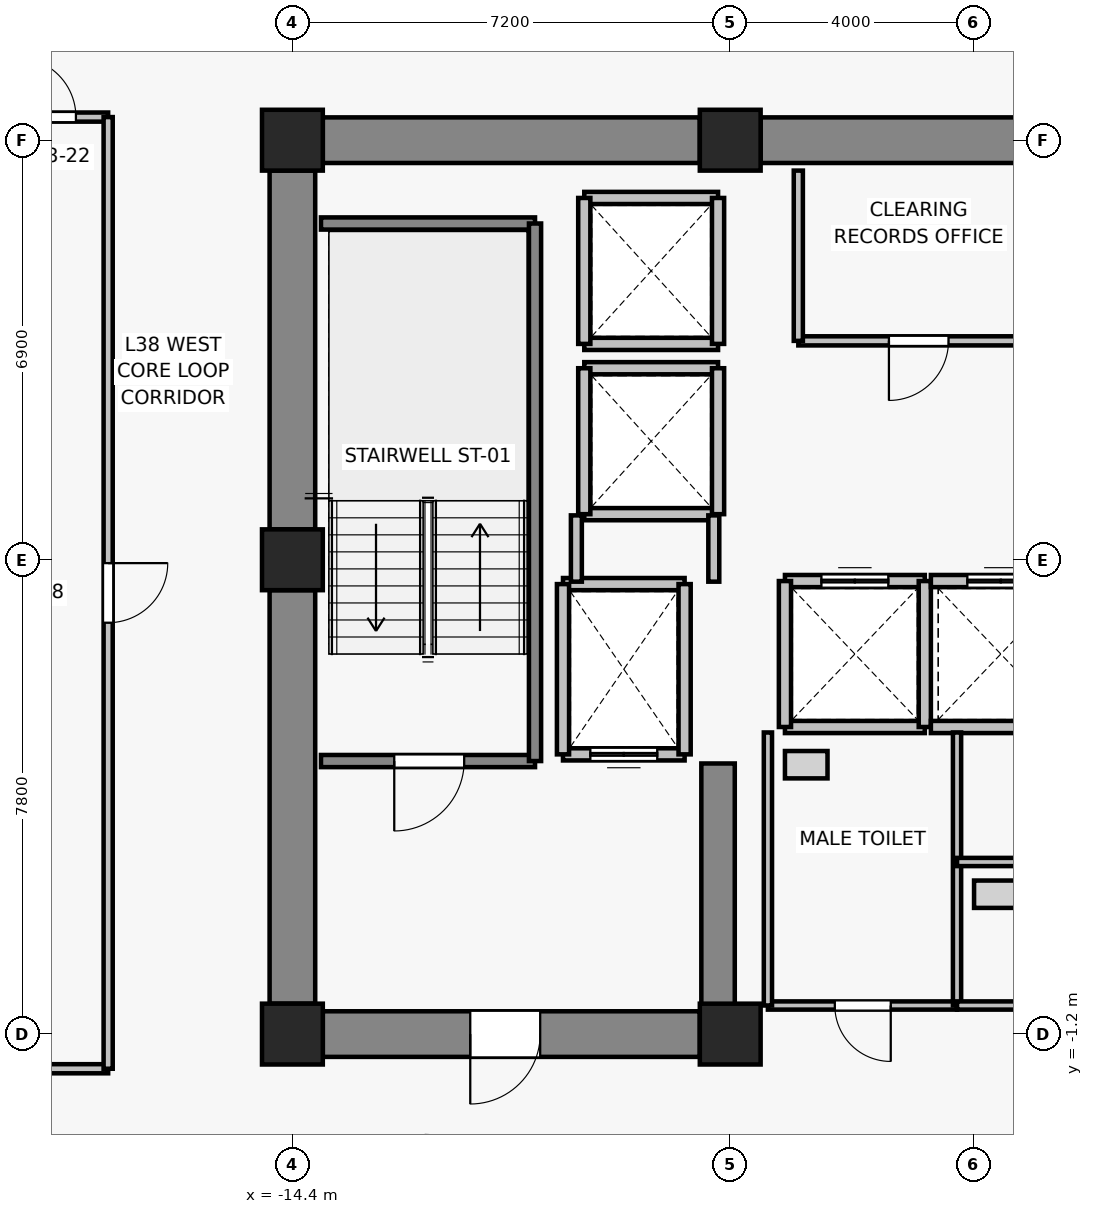
"""IFC4 building model, lengths in metres.
Left out: names, types, materials, properties, quantities, classifications, styles, units other than length and angle.
Written with IfcOpenShell. Run it as: python <this file> out.ifc"""

import sys

from ifc_helpers import new_model, si_unit, direction, frame, frame_2d, origin, origin_2d, place, context, subcontext, project, spatial, rectangle, extrude, source, transform, mapped, element, fill, save


model = new_model("IFC4")
c1 = context("Model", 3, precision=1e-05, world=origin(), true_north=direction((0.0, 1.0)))
c2 = subcontext(c1, "Body", "Model", "MODEL_VIEW")
j1 = project(units=[si_unit("LENGTHUNIT", "METRE"), si_unit("PLANEANGLEUNIT", "RADIAN")], contexts=[c1])
p1 = place(None, origin())
s1 = spatial("IfcSite", under=j1, at=p1, CompositionType="ELEMENT")
p2 = place(p1, origin())
s2 = spatial("IfcBuilding", under=s1, at=p2, CompositionType="ELEMENT")
p3 = place(p2, frame((0.0, 0.0, 136.3)))
s3 = spatial("IfcBuildingStorey", under=s2, at=p3, CompositionType="ELEMENT", Elevation=136.3)
for number, where, z_axis, x_axis in (
    (1, (-14.4, -1.2, 0.0), (0.0, 0.0, 1.0), (1.0, 0.0, 0.0)),
    (2, (-7.2, -1.2, 0.0), (0.0, 0.0, 1.0), (1.0, 0.0, 0.0)),
    (3, (-14.4, 6.6, 0.0), (0.0, 0.0, 1.0), (1.0, 0.0, 0.0)),
    (4, (-14.4, 13.5, 0.0), (0.0, 0.0, 1.0), (1.0, 0.0, 0.0)),
    (5, (-7.2, 13.5, 0.0), (0.0, 0.0, 1.0), (1.0, 0.0, 0.0)),
):
    element("IfcColumn", number, at=place(p3, frame(where, z_axis=z_axis, x_axis=x_axis)), inside=s3, PredefinedType="COLUMN", context=c2, shape_type="SweptSolid", body=[
        extrude(rectangle(XDim=1.0, YDim=1.0, at=origin_2d()), origin(), (0.0, 0.0, 1.0), 3.3),
    ])
p4 = place(p3, frame((-13.9, 13.5, 0.0), z_axis=(0.0, 0.0, 1.0), x_axis=(1.0, 0.0, 0.0)))
e6 = element("IfcWall", 6, at=p4, inside=s3, PredefinedType="SHEAR", context=c2, shape_type="SweptSolid", body=[
    extrude(rectangle(XDim=6.2, YDim=0.75, at=frame_2d((3.1, 0.0))), origin(), (0.0, 0.0, 1.0), 3.05),
])
p5 = place(p3, frame((-6.7, 13.5, 0.0), z_axis=(0.0, 0.0, 1.0), x_axis=(1.0, 0.0, 0.0)))
e7 = element("IfcWall", 7, at=p5, inside=s3, PredefinedType="SHEAR", context=c2, shape_type="SweptSolid", body=[
    extrude(rectangle(XDim=13.4, YDim=0.75, at=frame_2d((6.7, 0.0))), origin(), (0.0, 0.0, 1.0), 3.05),
])
p6 = place(p3, frame((-14.4, -0.7, 0.0), z_axis=(0.0, 0.0, 1.0), x_axis=(0.0, 1.0, 0.0)))
e8 = element("IfcWall", 8, at=p6, inside=s3, PredefinedType="SHEAR", context=c2, shape_type="SweptSolid", body=[
    extrude(rectangle(XDim=6.8, YDim=0.75, at=frame_2d((3.4, 0.0))), origin(), (0.0, 0.0, 1.0), 3.05),
])
p7 = place(p3, frame((-14.4, 7.1, 0.0), z_axis=(0.0, 0.0, 1.0), x_axis=(0.0, 1.0, 0.0)))
e9 = element("IfcWall", 9, at=p7, inside=s3, PredefinedType="SHEAR", context=c2, shape_type="SweptSolid", body=[
    extrude(rectangle(XDim=5.9, YDim=0.75, at=frame_2d((2.95, 0.0))), origin(), (0.0, 0.0, 1.0), 3.05),
])
p8 = place(p3, frame((-7.7, -1.2, 0.0), z_axis=(0.0, 0.0, 1.0), x_axis=(-1.0, 0.0, 0.0)))
e10 = element("IfcWall", 10, at=p8, inside=s3, PredefinedType="SHEAR", context=c2, shape_type="SweptSolid", body=[
    extrude(rectangle(XDim=6.2, YDim=0.75, at=frame_2d((3.1, 0.0))), origin(), (0.0, 0.0, 1.0), 3.05),
])
p9 = place(p8, frame((2.625, 0.0, 0.0)))
e11 = element("IfcOpeningElement", 11, at=p9, cuts=e10, PredefinedType="OPENING", context=c2, shape_type="SweptSolid", body=[
    extrude(rectangle(XDim=1.15, YDim=2.15, at=frame_2d((0.575, 1.075))), frame((0.0, 0.385, 0.0), z_axis=(0.0, -1.0, 0.0), x_axis=(1.0, 0.0, 0.0)), (0.0, 0.0, 1.0), 0.77),
])
p10 = place(p3, frame((-7.4, -0.825, 0.0), z_axis=(0.0, 0.0, 1.0), x_axis=(0.0, 1.0, 0.0)))
e12 = element("IfcWall", 12, at=p10, inside=s3, PredefinedType="SHEAR", context=c2, shape_type="SweptSolid", body=[
    extrude(rectangle(XDim=4.075, YDim=0.55, at=frame_2d((2.038, 0.0))), origin(), (0.0, 0.0, 1.0), 3.05),
])
p11 = place(p3, frame((-7.95, 3.4, 0.0), z_axis=(0.0, 0.0, 1.0), x_axis=(-1.0, 0.0, 0.0)))
e13 = element("IfcWall", 13, at=p11, inside=s3, PredefinedType="SOLIDWALL", context=c2, shape_type="SweptSolid", body=[
    extrude(rectangle(XDim=2.0, YDim=0.2, at=frame_2d((1.0, 0.0))), origin(), (0.0, 0.0, 1.0), 3.05),
])
p12 = place(p11, frame((0.45, 0.0, 0.0)))
e14 = element("IfcOpeningElement", 14, at=p12, cuts=e13, PredefinedType="OPENING", context=c2, shape_type="SweptSolid", body=[
    extrude(rectangle(XDim=1.1, YDim=2.2, at=frame_2d((0.55, 1.1))), frame((0.0, 0.11, 0.0), z_axis=(0.0, -1.0, 0.0), x_axis=(1.0, 0.0, 0.0)), (0.0, 0.0, 1.0), 0.22),
])
p13 = place(p3, frame((-9.95, 6.2, 0.0), z_axis=(0.0, 0.0, 1.0), x_axis=(1.0, 0.0, 0.0)))
e15 = element("IfcWall", 15, at=p13, inside=s3, PredefinedType="SOLIDWALL", context=c2, shape_type="SweptSolid", body=[
    extrude(rectangle(XDim=2.0, YDim=0.2, at=frame_2d((1.0, 0.0))), origin(), (0.0, 0.0, 1.0), 3.05),
])
for number, where, z_axis, x_axis in (
    (16, (-9.95, 3.4, 0.0), (0.0, 0.0, 1.0), (0.0, 1.0, 0.0)),
    (17, (-7.95, 6.2, 0.0), (0.0, 0.0, 1.0), (0.0, -1.0, 0.0)),
):
    element("IfcWall", number, at=place(p3, frame(where, z_axis=z_axis, x_axis=x_axis)), inside=s3, PredefinedType="SOLIDWALL", context=c2, shape_type="SweptSolid", body=[
        extrude(rectangle(XDim=2.8, YDim=0.2, at=frame_2d((1.4, 0.0))), origin(), (0.0, 0.0, 1.0), 3.05),
    ])
p14 = place(p3, frame((-4.0, 3.85, 0.0), z_axis=(0.0, 0.0, 1.0), x_axis=(-1.0, 0.0, 0.0)))
e18 = element("IfcWall", 18, at=p14, inside=s3, PredefinedType="SOLIDWALL", context=c2, shape_type="SweptSolid", body=[
    extrude(rectangle(XDim=2.3, YDim=0.2, at=frame_2d((1.15, 0.0))), origin(), (0.0, 0.0, 1.0), 3.05),
])
p15 = place(p3, frame((-6.3, 6.25, 0.0), z_axis=(0.0, 0.0, 1.0), x_axis=(1.0, 0.0, 0.0)))
e19 = element("IfcWall", 19, at=p15, inside=s3, PredefinedType="SOLIDWALL", context=c2, shape_type="SweptSolid", body=[
    extrude(rectangle(XDim=2.3, YDim=0.2, at=frame_2d((1.15, 0.0))), origin(), (0.0, 0.0, 1.0), 3.05),
])
p16 = place(p15, frame((0.6, 0.0, 0.0)))
e20 = element("IfcOpeningElement", 20, at=p16, cuts=e19, PredefinedType="OPENING", context=c2, shape_type="SweptSolid", body=[
    extrude(rectangle(XDim=1.1, YDim=2.2, at=frame_2d((0.55, 1.1))), frame((0.0, 0.11, 0.0), z_axis=(0.0, -1.0, 0.0), x_axis=(1.0, 0.0, 0.0)), (0.0, 0.0, 1.0), 0.22),
])
for number, where, z_axis, x_axis in (
    (21, (-6.3, 3.85, 0.0), (0.0, 0.0, 1.0), (0.0, 1.0, 0.0)),
    (22, (-4.0, 6.25, 0.0), (0.0, 0.0, 1.0), (0.0, -1.0, 0.0)),
):
    element("IfcWall", number, at=place(p3, frame(where, z_axis=z_axis, x_axis=x_axis)), inside=s3, PredefinedType="SOLIDWALL", context=c2, shape_type="SweptSolid", body=[
        extrude(rectangle(XDim=2.4, YDim=0.2, at=frame_2d((1.2, 0.0))), origin(), (0.0, 0.0, 1.0), 3.05),
    ])
p17 = place(p3, frame((-1.6, 3.85, 0.0), z_axis=(0.0, 0.0, 1.0), x_axis=(-1.0, 0.0, 0.0)))
e23 = element("IfcWall", 23, at=p17, inside=s3, PredefinedType="SOLIDWALL", context=c2, shape_type="SweptSolid", body=[
    extrude(rectangle(XDim=2.3, YDim=0.2, at=frame_2d((1.15, 0.0))), origin(), (0.0, 0.0, 1.0), 3.05),
])
p18 = place(p3, frame((-3.9, 6.25, 0.0), z_axis=(0.0, 0.0, 1.0), x_axis=(1.0, 0.0, 0.0)))
e24 = element("IfcWall", 24, at=p18, inside=s3, PredefinedType="SOLIDWALL", context=c2, shape_type="SweptSolid", body=[
    extrude(rectangle(XDim=2.3, YDim=0.2, at=frame_2d((1.15, 0.0))), origin(), (0.0, 0.0, 1.0), 3.05),
])
p19 = place(p18, frame((0.6, 0.0, 0.0)))
e25 = element("IfcOpeningElement", 25, at=p19, cuts=e24, PredefinedType="OPENING", context=c2, shape_type="SweptSolid", body=[
    extrude(rectangle(XDim=1.1, YDim=2.2, at=frame_2d((0.55, 1.1))), frame((0.0, 0.11, 0.0), z_axis=(0.0, -1.0, 0.0), x_axis=(1.0, 0.0, 0.0)), (0.0, 0.0, 1.0), 0.22),
])
for number, where, z_axis, x_axis in (
    (26, (-7.4, 7.35, 0.0), (0.0, 0.0, 1.0), (-1.0, 0.0, 0.0)),
    (27, (-9.6, 9.75, 0.0), (0.0, 0.0, 1.0), (1.0, 0.0, 0.0)),
):
    element("IfcWall", number, at=place(p3, frame(where, z_axis=z_axis, x_axis=x_axis)), inside=s3, PredefinedType="SOLIDWALL", context=c2, shape_type="SweptSolid", body=[
        extrude(rectangle(XDim=2.2, YDim=0.2, at=frame_2d((1.1, 0.0))), origin(), (0.0, 0.0, 1.0), 2.49),
    ])
p20 = place(p3, frame((-9.6, 7.35, 0.0), z_axis=(0.0, 0.0, 1.0), x_axis=(0.0, 1.0, 0.0)))
e28 = element("IfcWall", 28, at=p20, inside=s3, PredefinedType="SOLIDWALL", context=c2, shape_type="SweptSolid", body=[
    extrude(rectangle(XDim=2.4, YDim=0.2, at=frame_2d((1.2, 0.0))), origin(), (0.0, 0.0, 1.0), 3.05),
])
p21 = place(p3, frame((-7.4, 9.75, 0.0), z_axis=(0.0, 0.0, 1.0), x_axis=(0.0, -1.0, 0.0)))
e29 = element("IfcWall", 29, at=p21, inside=s3, PredefinedType="SOLIDWALL", context=c2, shape_type="SweptSolid", body=[
    extrude(rectangle(XDim=2.4, YDim=0.2, at=frame_2d((1.2, 0.0))), origin(), (0.0, 0.0, 1.0), 2.49),
])
for number, where, z_axis, x_axis in (
    (30, (-7.4, 10.15, 0.0), (0.0, 0.0, 1.0), (-1.0, 0.0, 0.0)),
    (31, (-9.6, 12.55, 0.0), (0.0, 0.0, 1.0), (1.0, 0.0, 0.0)),
):
    element("IfcWall", number, at=place(p3, frame(where, z_axis=z_axis, x_axis=x_axis)), inside=s3, PredefinedType="SOLIDWALL", context=c2, shape_type="SweptSolid", body=[
        extrude(rectangle(XDim=2.2, YDim=0.2, at=frame_2d((1.1, 0.0))), origin(), (0.0, 0.0, 1.0), 2.49),
    ])
p22 = place(p3, frame((-9.6, 10.15, 0.0), z_axis=(0.0, 0.0, 1.0), x_axis=(0.0, 1.0, 0.0)))
e32 = element("IfcWall", 32, at=p22, inside=s3, PredefinedType="SOLIDWALL", context=c2, shape_type="SweptSolid", body=[
    extrude(rectangle(XDim=2.4, YDim=0.2, at=frame_2d((1.2, 0.0))), origin(), (0.0, 0.0, 1.0), 3.05),
])
p23 = place(p3, frame((-7.4, 12.55, 0.0), z_axis=(0.0, 0.0, 1.0), x_axis=(0.0, -1.0, 0.0)))
e33 = element("IfcWall", 33, at=p23, inside=s3, PredefinedType="SOLIDWALL", context=c2, shape_type="SweptSolid", body=[
    extrude(rectangle(XDim=2.4, YDim=0.2, at=frame_2d((1.2, 0.0))), origin(), (0.0, 0.0, 1.0), 2.49),
])
p24 = place(p3, frame((-10.41, 3.29, 0.0), z_axis=(0.0, 0.0, 1.0), x_axis=(-1.0, 0.0, 0.0)))
e34 = element("IfcWall", 34, at=p24, inside=s3, PredefinedType="SOLIDWALL", context=c2, shape_type="SweptSolid", body=[
    extrude(rectangle(XDim=3.52, YDim=0.2, at=frame_2d((1.76, 0.0))), origin(), (0.0, 0.0, 1.0), 3.05),
])
p25 = place(p24, frame((1.165, 0.0, 0.0)))
e35 = element("IfcOpeningElement", 35, at=p25, cuts=e34, PredefinedType="OPENING", context=c2, shape_type="SweptSolid", body=[
    extrude(rectangle(XDim=1.15, YDim=2.15, at=frame_2d((0.575, 1.075))), frame((0.0, 0.11, 0.0), z_axis=(0.0, -1.0, 0.0), x_axis=(1.0, 0.0, 0.0)), (0.0, 0.0, 1.0), 0.22),
])
p26 = place(p3, frame((-13.93, 12.13, 0.0), z_axis=(0.0, 0.0, 1.0), x_axis=(1.0, 0.0, 0.0)))
e36 = element("IfcWall", 36, at=p26, inside=s3, PredefinedType="SOLIDWALL", context=c2, shape_type="SweptSolid", body=[
    extrude(rectangle(XDim=3.52, YDim=0.2, at=frame_2d((1.76, 0.0))), origin(), (0.0, 0.0, 1.0), 3.05),
])
p27 = place(p3, frame((-10.41, 12.13, 0.0), z_axis=(0.0, 0.0, 1.0), x_axis=(0.0, -1.0, 0.0)))
e37 = element("IfcWall", 37, at=p27, inside=s3, PredefinedType="SOLIDWALL", context=c2, shape_type="SweptSolid", body=[
    extrude(rectangle(XDim=8.84, YDim=0.2, at=frame_2d((4.42, 0.0))), origin(), (0.0, 0.0, 1.0), 3.05),
])
p28 = place(p3, frame((-9.73, 6.24, 0.0), z_axis=(0.0, 0.0, 1.0), x_axis=(0.0, 1.0, 0.0)))
e38 = element("IfcWall", 38, at=p28, inside=s3, PredefinedType="PARTITIONING", context=c2, shape_type="SweptSolid", body=[
    extrude(rectangle(XDim=1.09, YDim=0.18, at=frame_2d((0.545, 0.0))), origin(), (0.0, 0.0, 1.0), 3.05),
])
p29 = place(p3, frame((-7.47, 7.33, 0.0), z_axis=(0.0, 0.0, 1.0), x_axis=(0.0, -1.0, 0.0)))
e39 = element("IfcWall", 39, at=p29, inside=s3, PredefinedType="PARTITIONING", context=c2, shape_type="SweptSolid", body=[
    extrude(rectangle(XDim=1.09, YDim=0.18, at=frame_2d((0.545, 0.0))), origin(), (0.0, 0.0, 1.0), 2.49),
])
p30 = place(p3, frame((-2.12, 10.2, 0.0), z_axis=(0.0, 0.0, 1.0), x_axis=(-1.0, 0.0, 0.0)))
e40 = element("IfcWall", 40, at=p30, inside=s3, PredefinedType="PARTITIONING", context=c2, shape_type="SweptSolid", body=[
    extrude(rectangle(XDim=3.96, YDim=0.15, at=frame_2d((1.98, 0.0))), origin(), (0.0, 0.0, 1.0), 3.05),
])
p31 = place(p30, frame((1.49, 0.0, 0.0)))
e41 = element("IfcOpeningElement", 41, at=p31, cuts=e40, PredefinedType="OPENING", context=c2, shape_type="SweptSolid", body=[
    extrude(rectangle(XDim=0.98, YDim=2.15, at=frame_2d((0.49, 1.075))), frame((0.0, 0.085, 0.0), z_axis=(0.0, -1.0, 0.0), x_axis=(1.0, 0.0, 0.0)), (0.0, 0.0, 1.0), 0.17),
])
p32 = place(p3, frame((-6.08, 10.2, 0.0), z_axis=(0.0, 0.0, 1.0), x_axis=(0.0, 1.0, 0.0)))
e42 = element("IfcWall", 42, at=p32, inside=s3, PredefinedType="PARTITIONING", context=c2, shape_type="SweptSolid", body=[
    extrude(rectangle(XDim=2.8, YDim=0.15, at=frame_2d((1.4, 0.0))), origin(), (0.0, 0.0, 1.0), 3.05),
])
p33 = place(p3, frame((-3.47, -0.73, 0.0), z_axis=(0.0, 0.0, 1.0), x_axis=(-1.0, 0.0, 0.0)))
e43 = element("IfcWall", 43, at=p33, inside=s3, PredefinedType="PARTITIONING", context=c2, shape_type="SweptSolid", body=[
    extrude(rectangle(XDim=3.11, YDim=0.135, at=frame_2d((1.555, 0.0))), origin(), (0.0, 0.0, 1.0), 3.05),
])
p34 = place(p33, frame((1.09, 0.0, 0.0)))
e44 = element("IfcOpeningElement", 44, at=p34, cuts=e43, PredefinedType="OPENING", context=c2, shape_type="SweptSolid", body=[
    extrude(rectangle(XDim=0.92, YDim=2.1, at=frame_2d((0.46, 1.05))), frame((0.0, 0.077, 0.0), z_axis=(0.0, -1.0, 0.0), x_axis=(1.0, 0.0, 0.0)), (0.0, 0.0, 1.0), 0.155),
])
for number, where, z_axis, x_axis in (
    (45, (-6.58, -0.73, 0.0), (0.0, 0.0, 1.0), (0.0, 1.0, 0.0)),
    (46, (-3.47, 3.76, 0.0), (0.0, 0.0, 1.0), (0.0, -1.0, 0.0)),
):
    element("IfcWall", number, at=place(p3, frame(where, z_axis=z_axis, x_axis=x_axis)), inside=s3, PredefinedType="PARTITIONING", context=c2, shape_type="SweptSolid", body=[
        extrude(rectangle(XDim=4.49, YDim=0.135, at=frame_2d((2.245, 0.0))), origin(), (0.0, 0.0, 1.0), 3.05),
    ])
for number, where, z_axis, x_axis in (
    (47, (-1.47, -0.73, 0.0), (0.0, 0.0, 1.0), (-1.0, 0.0, 0.0)),
    (48, (-3.47, 1.63, 0.0), (0.0, 0.0, 1.0), (1.0, 0.0, 0.0)),
):
    element("IfcWall", number, at=place(p3, frame(where, z_axis=z_axis, x_axis=x_axis)), inside=s3, PredefinedType="PARTITIONING", context=c2, shape_type="SweptSolid", body=[
        extrude(rectangle(XDim=2.0, YDim=0.135, at=frame_2d((1.0, 0.0))), origin(), (0.0, 0.0, 1.0), 3.05),
    ])
p35 = place(p3, frame((-17.43, -1.77, 0.0), z_axis=(0.0, 0.0, 1.0), x_axis=(-1.0, 0.0, 0.0)))
e49 = element("IfcWall", 49, at=p35, inside=s3, PredefinedType="PARTITIONING", context=c2, shape_type="SweptSolid", body=[
    extrude(rectangle(XDim=8.1, YDim=0.15, at=frame_2d((4.05, 0.0))), origin(), (0.0, 0.0, 1.0), 2.49),
])
p36 = place(p3, frame((-21.13, 13.88, 0.0), z_axis=(0.0, 0.0, 1.0), x_axis=(1.0, 0.0, 0.0)))
e50 = element("IfcWall", 50, at=p36, inside=s3, PredefinedType="PARTITIONING", context=c2, shape_type="SweptSolid", body=[
    extrude(rectangle(XDim=3.7, YDim=0.15, at=frame_2d((1.85, 0.0))), origin(), (0.0, 0.0, 1.0), 3.05),
])
p37 = place(p36, frame((2.19, 0.0, 0.0)))
e51 = element("IfcOpeningElement", 51, at=p37, cuts=e50, PredefinedType="OPENING", context=c2, shape_type="SweptSolid", body=[
    extrude(rectangle(XDim=0.98, YDim=2.15, at=frame_2d((0.49, 1.075))), frame((0.0, 0.085, 0.0), z_axis=(0.0, -1.0, 0.0), x_axis=(1.0, 0.0, 0.0)), (0.0, 0.0, 1.0), 0.17),
])
p38 = place(p3, frame((-17.43, 13.88, 0.0), z_axis=(0.0, 0.0, 1.0), x_axis=(0.0, -1.0, 0.0)))
e52 = element("IfcWall", 52, at=p38, inside=s3, PredefinedType="PARTITIONING", context=c2, shape_type="SweptSolid", body=[
    extrude(rectangle(XDim=15.65, YDim=0.15, at=frame_2d((7.825, 0.0))), origin(), (0.0, 0.0, 1.0), 2.49),
])
p39 = place(p38, frame((7.335, 0.0, 0.0)))
e53 = element("IfcOpeningElement", 53, at=p39, cuts=e52, PredefinedType="OPENING", context=c2, shape_type="SweptSolid", body=[
    extrude(rectangle(XDim=0.98, YDim=2.15, at=frame_2d((0.49, 1.075))), frame((0.0, 0.085, 0.0), z_axis=(0.0, -1.0, 0.0), x_axis=(1.0, 0.0, 0.0)), (0.0, 0.0, 1.0), 0.17),
])
m1 = source(origin(), c2, "Body", "SweptSolid", [
    extrude(rectangle(XDim=1.1, YDim=2.2, at=frame_2d((0.55, 1.1))), frame((0.0, 0.025, 0.0), z_axis=(0.0, -1.0, 0.0), x_axis=(1.0, 0.0, 0.0)), (0.0, 0.0, 1.0), 0.05),
])
p40 = place(p12, origin())
e54 = element("IfcDoor", 54, at=p40, inside=s3, OperationType="DOUBLE_DOOR_SLIDING", PredefinedType="DOOR", context=c2, shape_type="MappedRepresentation", body=[
    mapped(m1, transform((0.0, 0.0, 0.0), x_axis=(1.0, 0.0, 0.0), y_axis=(0.0, 1.0, 0.0), z_axis=(0.0, 0.0, 1.0), scale=1.0)),
])
fill(e14, e54)
p41 = place(p16, origin())
e55 = element("IfcDoor", 55, at=p41, inside=s3, OperationType="DOUBLE_DOOR_SLIDING", PredefinedType="DOOR", context=c2, shape_type="MappedRepresentation", body=[
    mapped(m1, transform((0.0, 0.0, 0.0), x_axis=(1.0, 0.0, 0.0), y_axis=(0.0, 1.0, 0.0), z_axis=(0.0, 0.0, 1.0), scale=1.0)),
])
fill(e20, e55)
p42 = place(p19, origin())
e56 = element("IfcDoor", 56, at=p42, inside=s3, OperationType="DOUBLE_DOOR_SLIDING", PredefinedType="DOOR", context=c2, shape_type="MappedRepresentation", body=[
    mapped(m1, transform((0.0, 0.0, 0.0), x_axis=(1.0, 0.0, 0.0), y_axis=(0.0, 1.0, 0.0), z_axis=(0.0, 0.0, 1.0), scale=1.0)),
])
fill(e25, e56)
m2 = source(origin(), c2, "Body", "SweptSolid", [
    extrude(rectangle(XDim=1.15, YDim=2.15, at=frame_2d((0.575, 1.075))), frame((0.0, 0.025, 0.0), z_axis=(0.0, -1.0, 0.0), x_axis=(1.0, 0.0, 0.0)), (0.0, 0.0, 1.0), 0.05),
])
p43 = place(p25, origin())
e57 = element("IfcDoor", 57, at=p43, inside=s3, OperationType="SINGLE_SWING_RIGHT", PredefinedType="DOOR", context=c2, shape_type="MappedRepresentation", body=[
    mapped(m2, transform((0.0, 0.0, 0.0), x_axis=(1.0, 0.0, 0.0), y_axis=(0.0, 1.0, 0.0), z_axis=(0.0, 0.0, 1.0), scale=1.0)),
])
fill(e35, e57)
p44 = place(p9, origin())
e58 = element("IfcDoor", 58, at=p44, inside=s3, OperationType="SINGLE_SWING_RIGHT", PredefinedType="DOOR", context=c2, shape_type="MappedRepresentation", body=[
    mapped(m2, transform((0.0, 0.0, 0.0), x_axis=(1.0, 0.0, 0.0), y_axis=(0.0, 1.0, 0.0), z_axis=(0.0, 0.0, 1.0), scale=1.0)),
])
fill(e11, e58)
m3 = source(origin(), c2, "Body", "SweptSolid", [
    extrude(rectangle(XDim=0.98, YDim=2.15, at=frame_2d((0.49, 1.075))), frame((0.0, 0.025, 0.0), z_axis=(0.0, -1.0, 0.0), x_axis=(1.0, 0.0, 0.0)), (0.0, 0.0, 1.0), 0.05),
])
p45 = place(p31, origin())
e59 = element("IfcDoor", 59, at=p45, inside=s3, OperationType="SINGLE_SWING_RIGHT", PredefinedType="DOOR", context=c2, shape_type="MappedRepresentation", body=[
    mapped(m3, transform((0.0, 0.0, 0.0), x_axis=(1.0, 0.0, 0.0), y_axis=(0.0, 1.0, 0.0), z_axis=(0.0, 0.0, 1.0), scale=1.0)),
])
fill(e41, e59)
m4 = source(origin(), c2, "Body", "SweptSolid", [
    extrude(rectangle(XDim=0.92, YDim=2.1, at=frame_2d((0.46, 1.05))), frame((0.0, 0.025, 0.0), z_axis=(0.0, -1.0, 0.0), x_axis=(1.0, 0.0, 0.0)), (0.0, 0.0, 1.0), 0.05),
])
p46 = place(p34, origin())
e60 = element("IfcDoor", 60, at=p46, inside=s3, OperationType="SINGLE_SWING_LEFT", PredefinedType="DOOR", context=c2, shape_type="MappedRepresentation", body=[
    mapped(m4, transform((0.0, 0.0, 0.0), x_axis=(1.0, 0.0, 0.0), y_axis=(0.0, 1.0, 0.0), z_axis=(0.0, 0.0, 1.0), scale=1.0)),
])
fill(e44, e60)
p47 = place(p39, origin())
e61 = element("IfcDoor", 61, at=p47, inside=s3, OperationType="SINGLE_SWING_LEFT", PredefinedType="DOOR", context=c2, shape_type="MappedRepresentation", body=[
    mapped(m3, transform((0.0, 0.0, 0.0), x_axis=(1.0, 0.0, 0.0), y_axis=(0.0, 1.0, 0.0), z_axis=(0.0, 0.0, 1.0), scale=1.0)),
])
fill(e53, e61)
p48 = place(p37, origin())
e62 = element("IfcDoor", 62, at=p48, inside=s3, OperationType="SINGLE_SWING_LEFT", PredefinedType="DOOR", context=c2, shape_type="MappedRepresentation", body=[
    mapped(m3, transform((0.0, 0.0, 0.0), x_axis=(1.0, 0.0, 0.0), y_axis=(0.0, 1.0, 0.0), z_axis=(0.0, 0.0, 1.0), scale=1.0)),
])
fill(e51, e62)
save(model, sys.argv[1])
